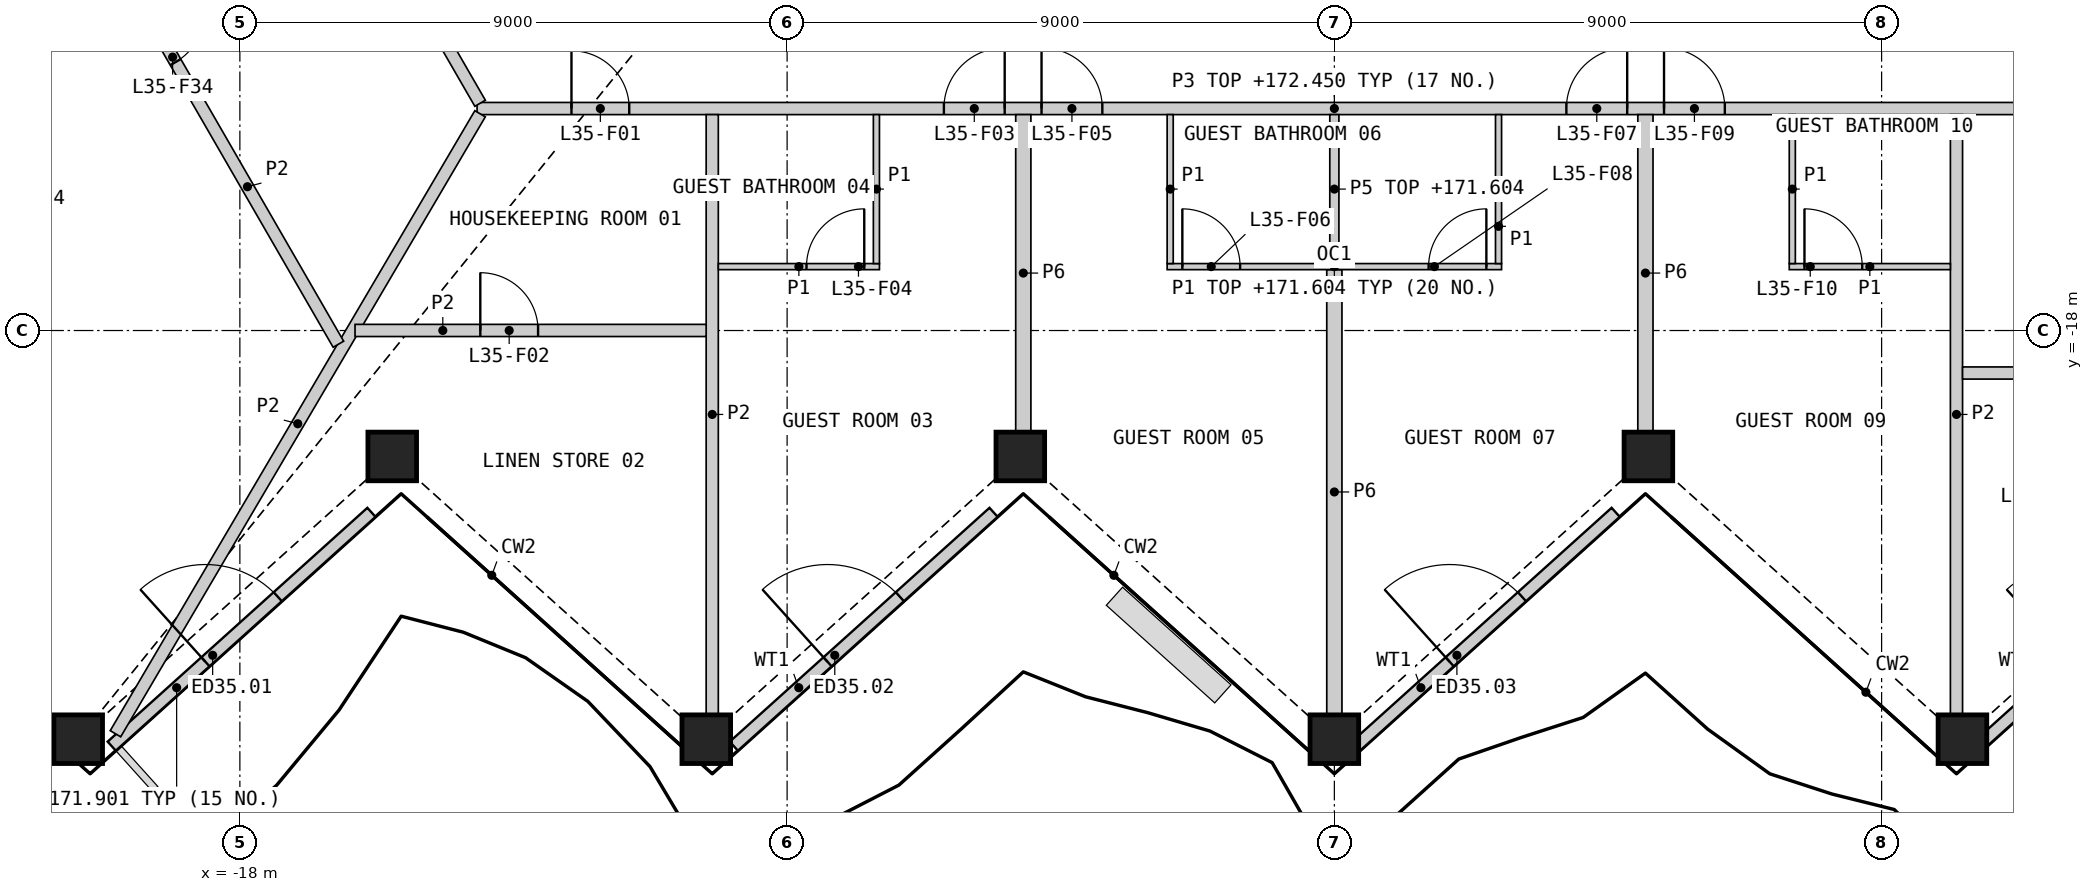
"""IFC4 building model, lengths in metres.
Left out: names, types, materials, properties, quantities, classifications, styles, units other than length and angle.
Written with IfcOpenShell. Run it as: python <this file> out.ifc"""

import sys

from ifc_helpers import new_model, si_unit, direction, frame, frame_2d, origin, origin_2d, place, context, subcontext, project, spatial, rectangle, hollow_rectangle, extrude, element, fill, save


model = new_model("IFC4")
c1 = context("Model", 3, precision=1e-05, world=origin(), true_north=direction((0.0, 1.0)))
c2 = subcontext(c1, "Body", "Model", "MODEL_VIEW")
j1 = project(units=[si_unit("LENGTHUNIT", "METRE"), si_unit("PLANEANGLEUNIT", "RADIAN")], contexts=[c1])
p1 = place(None, origin())
s1 = spatial("IfcSite", under=j1, at=p1, CompositionType="ELEMENT")
p2 = place(p1, origin())
s2 = spatial("IfcBuilding", under=s1, at=p2, CompositionType="ELEMENT")
p3 = place(p2, frame((0.0, 0.0, 169.2)))
s3 = spatial("IfcBuildingStorey", under=s2, at=p3, CompositionType="ELEMENT", Elevation=169.2)
for number, where, z_axis, x_axis in (
    (1, (-20.659, -24.722, 0.0), (0.0, 0.0, 1.0), (1.0, 0.0, 0.0)),
    (2, (-15.494, -20.071, 0.0), (0.0, 0.0, 1.0), (1.0, 0.0, 0.0)),
    (3, (-10.329, -24.722, 0.0), (0.0, 0.0, 1.0), (1.0, 0.0, 0.0)),
    (4, (-5.165, -20.071, 0.0), (0.0, 0.0, 1.0), (1.0, 0.0, 0.0)),
    (5, (0.0, -24.722, 0.0), (0.0, 0.0, 1.0), (1.0, 0.0, 0.0)),
    (6, (5.165, -20.071, 0.0), (0.0, 0.0, 1.0), (1.0, 0.0, 0.0)),
    (7, (10.329, -24.722, 0.0), (0.0, 0.0, 1.0), (1.0, 0.0, 0.0)),
):
    element("IfcColumn", number, at=place(p3, frame(where, z_axis=z_axis, x_axis=x_axis)), inside=s3, PredefinedType="COLUMN", context=c2, shape_type="SweptSolid", body=[
        extrude(hollow_rectangle(XDim=0.8, YDim=0.8, WallThickness=0.05, at=origin_2d()), origin(), (0.0, 0.0, 1.0), 3.6),
    ])
p4 = place(p3, frame((-20.108, -24.836, 0.0), z_axis=(0.0, 0.0, 1.0), x_axis=(0.74315473474, 0.669119600844, 0.0)))
e8 = element("IfcWall", 8, at=p4, inside=s3, PredefinedType="SOLIDWALL", context=c2, shape_type="SweptSolid", body=[
    extrude(rectangle(XDim=5.748, YDim=0.2, at=frame_2d((2.874, 0.0))), origin(), (0.0, 0.0, 1.0), 2.701),
])
p5 = place(p4, frame((2.074, 0.0, 0.0)))
e9 = element("IfcOpeningElement", 9, at=p5, cuts=e8, PredefinedType="OPENING", context=c2, shape_type="SweptSolid", body=[
    extrude(rectangle(XDim=1.6, YDim=2.4, at=frame_2d((0.8, 1.2))), frame((0.0, 0.11, 0.0), z_axis=(0.0, -1.0, 0.0), x_axis=(1.0, 0.0, 0.0)), (0.0, 0.0, 1.0), 0.22),
])
p6 = place(p3, frame((-9.876, -24.836, 0.0), z_axis=(0.0, 0.0, 1.0), x_axis=(0.74315473474, 0.669119600844, 0.0)))
e10 = element("IfcWall", 10, at=p6, inside=s3, PredefinedType="SOLIDWALL", context=c2, shape_type="SweptSolid", body=[
    extrude(rectangle(XDim=5.748, YDim=0.2, at=frame_2d((2.874, 0.0))), origin(), (0.0, 0.0, 1.0), 2.701),
])
p7 = place(p6, frame((2.074, 0.0, 0.0)))
e11 = element("IfcOpeningElement", 11, at=p7, cuts=e10, PredefinedType="OPENING", context=c2, shape_type="SweptSolid", body=[
    extrude(rectangle(XDim=1.6, YDim=2.4, at=frame_2d((0.8, 1.2))), frame((0.0, 0.11, 0.0), z_axis=(0.0, -1.0, 0.0), x_axis=(1.0, 0.0, 0.0)), (0.0, 0.0, 1.0), 0.22),
])
p8 = place(p3, frame((0.355, -24.836, 0.0), z_axis=(0.0, 0.0, 1.0), x_axis=(0.74315473474, 0.669119600844, 0.0)))
e12 = element("IfcWall", 12, at=p8, inside=s3, PredefinedType="SOLIDWALL", context=c2, shape_type="SweptSolid", body=[
    extrude(rectangle(XDim=5.748, YDim=0.2, at=frame_2d((2.874, 0.0))), origin(), (0.0, 0.0, 1.0), 2.701),
])
p9 = place(p8, frame((2.074, 0.0, 0.0)))
e13 = element("IfcOpeningElement", 13, at=p9, cuts=e12, PredefinedType="OPENING", context=c2, shape_type="SweptSolid", body=[
    extrude(rectangle(XDim=1.6, YDim=2.4, at=frame_2d((0.8, 1.2))), frame((0.0, 0.11, 0.0), z_axis=(0.0, -1.0, 0.0), x_axis=(1.0, 0.0, 0.0)), (0.0, 0.0, 1.0), 0.22),
])
p10 = place(p3, frame((10.587, -24.836, 0.0), z_axis=(0.0, 0.0, 1.0), x_axis=(0.74315473474, 0.669119600844, 0.0)))
e14 = element("IfcWall", 14, at=p10, inside=s3, PredefinedType="SOLIDWALL", context=c2, shape_type="SweptSolid", body=[
    extrude(rectangle(XDim=5.748, YDim=0.2, at=frame_2d((2.874, 0.0))), origin(), (0.0, 0.0, 1.0), 2.701),
])
p11 = place(p10, frame((2.074, 0.0, 0.0)))
e15 = element("IfcOpeningElement", 15, at=p11, cuts=e14, PredefinedType="OPENING", context=c2, shape_type="SweptSolid", body=[
    extrude(rectangle(XDim=1.6, YDim=2.4, at=frame_2d((0.8, 1.2))), frame((0.0, 0.11, 0.0), z_axis=(0.0, -1.0, 0.0), x_axis=(1.0, 0.0, 0.0)), (0.0, 0.0, 1.0), 0.22),
])
p12 = place(p3, frame((-14.099, -14.349, 0.0), z_axis=(0.0, 0.0, 1.0), x_axis=(1.0, 0.0, 0.0)))
e16 = element("IfcWall", 16, at=p12, inside=s3, PredefinedType="PARTITIONING", context=c2, shape_type="SweptSolid", body=[
    extrude(rectangle(XDim=28.198, YDim=0.2, at=frame_2d((14.099, 0.0))), origin(), (0.0, 0.0, 1.0), 3.25),
])
p13 = place(p12, frame((1.552, 0.0, 0.0)))
e17 = element("IfcOpeningElement", 17, at=p13, cuts=e16, PredefinedType="OPENING", context=c2, shape_type="SweptSolid", body=[
    extrude(rectangle(XDim=0.95, YDim=2.1, at=frame_2d((0.475, 1.05))), frame((0.0, 0.11, 0.0), z_axis=(0.0, -1.0, 0.0), x_axis=(1.0, 0.0, 0.0)), (0.0, 0.0, 1.0), 0.22),
])
p14 = place(p12, frame((7.677, 0.0, 0.0)))
e18 = element("IfcOpeningElement", 18, at=p14, cuts=e16, PredefinedType="OPENING", context=c2, shape_type="SweptSolid", body=[
    extrude(rectangle(XDim=1.0, YDim=2.1, at=frame_2d((0.5, 1.05))), frame((0.0, 0.11, 0.0), z_axis=(0.0, -1.0, 0.0), x_axis=(1.0, 0.0, 0.0)), (0.0, 0.0, 1.0), 0.22),
])
p15 = place(p12, frame((9.283, 0.0, 0.0)))
e19 = element("IfcOpeningElement", 19, at=p15, cuts=e16, PredefinedType="OPENING", context=c2, shape_type="SweptSolid", body=[
    extrude(rectangle(XDim=1.0, YDim=2.1, at=frame_2d((0.5, 1.05))), frame((0.0, 0.11, 0.0), z_axis=(0.0, -1.0, 0.0), x_axis=(1.0, 0.0, 0.0)), (0.0, 0.0, 1.0), 0.22),
])
p16 = place(p12, frame((17.915, 0.0, 0.0)))
e20 = element("IfcOpeningElement", 20, at=p16, cuts=e16, PredefinedType="OPENING", context=c2, shape_type="SweptSolid", body=[
    extrude(rectangle(XDim=1.0, YDim=2.1, at=frame_2d((0.5, 1.05))), frame((0.0, 0.11, 0.0), z_axis=(0.0, -1.0, 0.0), x_axis=(1.0, 0.0, 0.0)), (0.0, 0.0, 1.0), 0.22),
])
p17 = place(p12, frame((19.521, 0.0, 0.0)))
e21 = element("IfcOpeningElement", 21, at=p17, cuts=e16, PredefinedType="OPENING", context=c2, shape_type="SweptSolid", body=[
    extrude(rectangle(XDim=1.0, YDim=2.1, at=frame_2d((0.5, 1.05))), frame((0.0, 0.11, 0.0), z_axis=(0.0, -1.0, 0.0), x_axis=(1.0, 0.0, 0.0)), (0.0, 0.0, 1.0), 0.22),
])
p18 = place(p12, frame((25.696, 0.0, 0.0)))
e22 = element("IfcOpeningElement", 22, at=p18, cuts=e16, PredefinedType="OPENING", context=c2, shape_type="SweptSolid", body=[
    extrude(rectangle(XDim=0.95, YDim=2.1, at=frame_2d((0.475, 1.05))), frame((0.0, 0.11, 0.0), z_axis=(0.0, -1.0, 0.0), x_axis=(1.0, 0.0, 0.0)), (0.0, 0.0, 1.0), 0.22),
])
p19 = place(p3, frame((0.0, -24.312, 0.0), z_axis=(0.0, 0.0, 1.0), x_axis=(0.0, 1.0, 0.0)))
e23 = element("IfcWall", 23, at=p19, inside=s3, PredefinedType="PARTITIONING", context=c2, shape_type="SweptSolid", body=[
    extrude(rectangle(XDim=7.313, YDim=0.25, at=frame_2d((3.656, 0.0))), origin(), (0.0, 0.0, 1.0), 2.404),
])
for number, where, z_axis, x_axis in (
    (24, (-5.116, -19.661, 0.0), (0.0, 0.0, 1.0), (0.0, 1.0, 0.0)),
    (25, (5.116, -19.661, 0.0), (0.0, 0.0, 1.0), (0.0, 1.0, 0.0)),
):
    element("IfcWall", number, at=place(p3, frame(where, z_axis=z_axis, x_axis=x_axis)), inside=s3, PredefinedType="PARTITIONING", context=c2, shape_type="SweptSolid", body=[
        extrude(rectangle(XDim=5.212, YDim=0.25, at=frame_2d((2.606, 0.0))), origin(), (0.0, 0.0, 1.0), 2.404),
    ])
p20 = place(p3, frame((-15.55, -11.662, 0.0), z_axis=(0.0, 0.0, 1.0), x_axis=(0.500048608389, -0.865997337899, 0.0)))
e26 = element("IfcWall", 26, at=p20, inside=s3, PredefinedType="PARTITIONING", context=c2, shape_type="SweptSolid", body=[
    extrude(rectangle(XDim=3.002, YDim=0.2, at=frame_2d((1.501, 0.0))), origin(), (0.0, 0.0, 1.0), 3.25),
])
p21 = place(p3, frame((-20.046, -24.632, 0.0), z_axis=(0.0, 0.0, 1.0), x_axis=(0.50691549935, 0.86199575203, 0.0)))
e27 = element("IfcWall", 27, at=p21, inside=s3, PredefinedType="PARTITIONING", context=c2, shape_type="SweptSolid", body=[
    extrude(rectangle(XDim=11.83, YDim=0.2, at=frame_2d((5.915, 0.0))), origin(), (0.0, 0.0, 1.0), 2.404),
])
p22 = place(p3, frame((-22.363, -7.862, 0.0), z_axis=(0.0, 0.0, 1.0), x_axis=(0.500009728207, -0.866019787128, 0.0)))
e28 = element("IfcWall", 28, at=p22, inside=s3, PredefinedType="PARTITIONING", context=c2, shape_type="SweptSolid", body=[
    extrude(rectangle(XDim=11.967, YDim=0.2, at=frame_2d((5.983, 0.0))), origin(), (0.0, 0.0, 1.0), 2.404),
])
p23 = place(p22, frame((5.658, 0.0, 0.0)))
e29 = element("IfcOpeningElement", 29, at=p23, cuts=e28, PredefinedType="OPENING", context=c2, shape_type="SweptSolid", body=[
    extrude(rectangle(XDim=0.95, YDim=2.1, at=frame_2d((0.475, 1.05))), frame((0.0, 0.11, 0.0), z_axis=(0.0, -1.0, 0.0), x_axis=(1.0, 0.0, 0.0)), (0.0, 0.0, 1.0), 0.22),
])
for number, where, z_axis, x_axis in (
    (30, (-10.231, -24.312, 0.0), (0.0, 0.0, 1.0), (0.0, 1.0, 0.0)),
    (31, (10.231, -24.312, 0.0), (0.0, 0.0, 1.0), (0.0, 1.0, 0.0)),
):
    element("IfcWall", number, at=place(p3, frame(where, z_axis=z_axis, x_axis=x_axis)), inside=s3, PredefinedType="PARTITIONING", context=c2, shape_type="SweptSolid", body=[
        extrude(rectangle(XDim=9.863, YDim=0.2, at=frame_2d((4.931, 0.0))), origin(), (0.0, 0.0, 1.0), 2.404),
    ])
p24 = place(p3, frame((10.331, -18.699, 0.0), z_axis=(0.0, 0.0, 1.0), x_axis=(1.0, 0.0, 0.0)))
e32 = element("IfcWall", 32, at=p24, inside=s3, PredefinedType="PARTITIONING", context=c2, shape_type="SweptSolid", body=[
    extrude(rectangle(XDim=6.179, YDim=0.2, at=frame_2d((3.09, 0.0))), origin(), (0.0, 0.0, 1.0), 2.404),
])
p25 = place(p24, frame((2.866, 0.0, 0.0)))
e33 = element("IfcOpeningElement", 33, at=p25, cuts=e32, PredefinedType="OPENING", context=c2, shape_type="SweptSolid", body=[
    extrude(rectangle(XDim=0.95, YDim=2.1, at=frame_2d((0.475, 1.05))), frame((0.0, 0.11, 0.0), z_axis=(0.0, -1.0, 0.0), x_axis=(1.0, 0.0, 0.0)), (0.0, 0.0, 1.0), 0.22),
])
p26 = place(p3, frame((-16.106, -17.999, 0.0), z_axis=(0.0, 0.0, 1.0), x_axis=(1.0, 0.0, 0.0)))
e34 = element("IfcWall", 34, at=p26, inside=s3, PredefinedType="PARTITIONING", context=c2, shape_type="SweptSolid", body=[
    extrude(rectangle(XDim=5.775, YDim=0.2, at=frame_2d((2.887, 0.0))), origin(), (0.0, 0.0, 1.0), 2.404),
])
p27 = place(p26, frame((2.06, 0.0, 0.0)))
e35 = element("IfcOpeningElement", 35, at=p27, cuts=e34, PredefinedType="OPENING", context=c2, shape_type="SweptSolid", body=[
    extrude(rectangle(XDim=0.95, YDim=2.1, at=frame_2d((0.475, 1.05))), frame((0.0, 0.11, 0.0), z_axis=(0.0, -1.0, 0.0), x_axis=(1.0, 0.0, 0.0)), (0.0, 0.0, 1.0), 0.22),
])
p28 = place(p3, frame((0.0, -16.899, 0.0), z_axis=(0.0, 0.0, 1.0), x_axis=(0.0, 1.0, 0.0)))
e36 = element("IfcWall", 36, at=p28, inside=s3, PredefinedType="PLUMBINGWALL", context=c2, shape_type="SweptSolid", body=[
    extrude(rectangle(XDim=2.45, YDim=0.15, at=frame_2d((1.225, 0.0))), origin(), (0.0, 0.0, 1.0), 2.404),
])
p29 = place(p3, frame((-2.75, -16.949, 0.0), z_axis=(0.0, 0.0, 1.0), x_axis=(1.0, 0.0, 0.0)))
e37 = element("IfcWall", 37, at=p29, inside=s3, PredefinedType="PARTITIONING", context=c2, shape_type="SweptSolid", body=[
    extrude(rectangle(XDim=5.5, YDim=0.1, at=frame_2d((2.75, 0.0))), origin(), (0.0, 0.0, 1.0), 2.404),
])
p30 = place(p29, frame((0.25, 0.0, 0.0)))
e38 = element("IfcOpeningElement", 38, at=p30, cuts=e37, PredefinedType="OPENING", context=c2, shape_type="SweptSolid", body=[
    extrude(rectangle(XDim=0.95, YDim=2.1, at=frame_2d((0.475, 1.05))), frame((0.0, 0.06, 0.0), z_axis=(0.0, -1.0, 0.0), x_axis=(1.0, 0.0, 0.0)), (0.0, 0.0, 1.0), 0.12),
])
p31 = place(p29, frame((4.3, 0.0, 0.0)))
e39 = element("IfcOpeningElement", 39, at=p31, cuts=e37, PredefinedType="OPENING", context=c2, shape_type="SweptSolid", body=[
    extrude(rectangle(XDim=0.95, YDim=2.1, at=frame_2d((0.475, 1.05))), frame((0.0, 0.06, 0.0), z_axis=(0.0, -1.0, 0.0), x_axis=(1.0, 0.0, 0.0)), (0.0, 0.0, 1.0), 0.12),
])
p32 = place(p3, frame((-10.131, -16.949, 0.0), z_axis=(0.0, 0.0, 1.0), x_axis=(1.0, 0.0, 0.0)))
e40 = element("IfcWall", 40, at=p32, inside=s3, PredefinedType="PARTITIONING", context=c2, shape_type="SweptSolid", body=[
    extrude(rectangle(XDim=2.65, YDim=0.1, at=frame_2d((1.325, 0.0))), origin(), (0.0, 0.0, 1.0), 2.404),
])
p33 = place(p32, frame((1.45, 0.0, 0.0)))
e41 = element("IfcOpeningElement", 41, at=p33, cuts=e40, PredefinedType="OPENING", context=c2, shape_type="SweptSolid", body=[
    extrude(rectangle(XDim=0.95, YDim=2.1, at=frame_2d((0.475, 1.05))), frame((0.0, 0.06, 0.0), z_axis=(0.0, -1.0, 0.0), x_axis=(1.0, 0.0, 0.0)), (0.0, 0.0, 1.0), 0.12),
])
p34 = place(p3, frame((7.481, -16.949, 0.0), z_axis=(0.0, 0.0, 1.0), x_axis=(1.0, 0.0, 0.0)))
e42 = element("IfcWall", 42, at=p34, inside=s3, PredefinedType="PARTITIONING", context=c2, shape_type="SweptSolid", body=[
    extrude(rectangle(XDim=2.65, YDim=0.1, at=frame_2d((1.325, 0.0))), origin(), (0.0, 0.0, 1.0), 2.404),
])
p35 = place(p34, frame((0.25, 0.0, 0.0)))
e43 = element("IfcOpeningElement", 43, at=p35, cuts=e42, PredefinedType="OPENING", context=c2, shape_type="SweptSolid", body=[
    extrude(rectangle(XDim=0.95, YDim=2.1, at=frame_2d((0.475, 1.05))), frame((0.0, 0.06, 0.0), z_axis=(0.0, -1.0, 0.0), x_axis=(1.0, 0.0, 0.0)), (0.0, 0.0, 1.0), 0.12),
])
for number, where, z_axis, x_axis in (
    (44, (-7.531, -16.899, 0.0), (0.0, 0.0, 1.0), (0.0, 1.0, 0.0)),
    (45, (-2.7, -16.899, 0.0), (0.0, 0.0, 1.0), (0.0, 1.0, 0.0)),
    (46, (2.7, -16.899, 0.0), (0.0, 0.0, 1.0), (0.0, 1.0, 0.0)),
    (47, (7.531, -16.899, 0.0), (0.0, 0.0, 1.0), (0.0, 1.0, 0.0)),
):
    element("IfcWall", number, at=place(p3, frame(where, z_axis=z_axis, x_axis=x_axis)), inside=s3, PredefinedType="PARTITIONING", context=c2, shape_type="SweptSolid", body=[
        extrude(rectangle(XDim=2.45, YDim=0.1, at=frame_2d((1.225, 0.0))), origin(), (0.0, 0.0, 1.0), 2.404),
    ])
p36 = place(p5, origin())
e48 = element("IfcDoor", 48, at=p36, inside=s3, OperationType="DOUBLE_DOOR_SINGLE_SWING", PredefinedType="DOOR", context=c2, shape_type="SweptSolid", body=[
    extrude(rectangle(XDim=1.6, YDim=2.4, at=frame_2d((0.8, 1.2))), frame((0.0, 0.025, 0.0), z_axis=(0.0, -1.0, 0.0), x_axis=(1.0, 0.0, 0.0)), (0.0, 0.0, 1.0), 0.05),
])
fill(e9, e48)
p37 = place(p7, origin())
e49 = element("IfcDoor", 49, at=p37, inside=s3, OperationType="DOUBLE_DOOR_SINGLE_SWING", PredefinedType="DOOR", context=c2, shape_type="SweptSolid", body=[
    extrude(rectangle(XDim=1.6, YDim=2.4, at=frame_2d((0.8, 1.2))), frame((0.0, 0.025, 0.0), z_axis=(0.0, -1.0, 0.0), x_axis=(1.0, 0.0, 0.0)), (0.0, 0.0, 1.0), 0.05),
])
fill(e11, e49)
p38 = place(p9, origin())
e50 = element("IfcDoor", 50, at=p38, inside=s3, OperationType="DOUBLE_DOOR_SINGLE_SWING", PredefinedType="DOOR", context=c2, shape_type="SweptSolid", body=[
    extrude(rectangle(XDim=1.6, YDim=2.4, at=frame_2d((0.8, 1.2))), frame((0.0, 0.025, 0.0), z_axis=(0.0, -1.0, 0.0), x_axis=(1.0, 0.0, 0.0)), (0.0, 0.0, 1.0), 0.05),
])
fill(e13, e50)
p39 = place(p13, origin())
e51 = element("IfcDoor", 51, at=p39, inside=s3, OperationType="SINGLE_SWING_LEFT", PredefinedType="DOOR", context=c2, shape_type="SweptSolid", body=[
    extrude(rectangle(XDim=0.95, YDim=2.1, at=frame_2d((0.475, 1.05))), frame((0.0, 0.025, 0.0), z_axis=(0.0, -1.0, 0.0), x_axis=(1.0, 0.0, 0.0)), (0.0, 0.0, 1.0), 0.05),
])
fill(e17, e51)
p40 = place(p27, origin())
e52 = element("IfcDoor", 52, at=p40, inside=s3, OperationType="SINGLE_SWING_LEFT", PredefinedType="DOOR", context=c2, shape_type="SweptSolid", body=[
    extrude(rectangle(XDim=0.95, YDim=2.1, at=frame_2d((0.475, 1.05))), frame((0.0, 0.025, 0.0), z_axis=(0.0, -1.0, 0.0), x_axis=(1.0, 0.0, 0.0)), (0.0, 0.0, 1.0), 0.05),
])
fill(e35, e52)
p41 = place(p14, origin())
e53 = element("IfcDoor", 53, at=p41, inside=s3, OperationType="SINGLE_SWING_RIGHT", PredefinedType="DOOR", context=c2, shape_type="SweptSolid", body=[
    extrude(rectangle(XDim=1.0, YDim=2.1, at=frame_2d((0.5, 1.05))), frame((0.0, 0.025, 0.0), z_axis=(0.0, -1.0, 0.0), x_axis=(1.0, 0.0, 0.0)), (0.0, 0.0, 1.0), 0.05),
])
fill(e18, e53)
p42 = place(p33, origin())
e54 = element("IfcDoor", 54, at=p42, inside=s3, OperationType="SINGLE_SWING_RIGHT", PredefinedType="DOOR", context=c2, shape_type="SweptSolid", body=[
    extrude(rectangle(XDim=0.95, YDim=2.1, at=frame_2d((0.475, 1.05))), frame((0.0, 0.025, 0.0), z_axis=(0.0, -1.0, 0.0), x_axis=(1.0, 0.0, 0.0)), (0.0, 0.0, 1.0), 0.05),
])
fill(e41, e54)
p43 = place(p15, origin())
e55 = element("IfcDoor", 55, at=p43, inside=s3, OperationType="SINGLE_SWING_LEFT", PredefinedType="DOOR", context=c2, shape_type="SweptSolid", body=[
    extrude(rectangle(XDim=1.0, YDim=2.1, at=frame_2d((0.5, 1.05))), frame((0.0, 0.025, 0.0), z_axis=(0.0, -1.0, 0.0), x_axis=(1.0, 0.0, 0.0)), (0.0, 0.0, 1.0), 0.05),
])
fill(e19, e55)
p44 = place(p30, origin())
e56 = element("IfcDoor", 56, at=p44, inside=s3, OperationType="SINGLE_SWING_LEFT", PredefinedType="DOOR", context=c2, shape_type="SweptSolid", body=[
    extrude(rectangle(XDim=0.95, YDim=2.1, at=frame_2d((0.475, 1.05))), frame((0.0, 0.025, 0.0), z_axis=(0.0, -1.0, 0.0), x_axis=(1.0, 0.0, 0.0)), (0.0, 0.0, 1.0), 0.05),
])
fill(e38, e56)
p45 = place(p16, origin())
e57 = element("IfcDoor", 57, at=p45, inside=s3, OperationType="SINGLE_SWING_RIGHT", PredefinedType="DOOR", context=c2, shape_type="SweptSolid", body=[
    extrude(rectangle(XDim=1.0, YDim=2.1, at=frame_2d((0.5, 1.05))), frame((0.0, 0.025, 0.0), z_axis=(0.0, -1.0, 0.0), x_axis=(1.0, 0.0, 0.0)), (0.0, 0.0, 1.0), 0.05),
])
fill(e20, e57)
p46 = place(p31, origin())
e58 = element("IfcDoor", 58, at=p46, inside=s3, OperationType="SINGLE_SWING_RIGHT", PredefinedType="DOOR", context=c2, shape_type="SweptSolid", body=[
    extrude(rectangle(XDim=0.95, YDim=2.1, at=frame_2d((0.475, 1.05))), frame((0.0, 0.025, 0.0), z_axis=(0.0, -1.0, 0.0), x_axis=(1.0, 0.0, 0.0)), (0.0, 0.0, 1.0), 0.05),
])
fill(e39, e58)
p47 = place(p17, origin())
e59 = element("IfcDoor", 59, at=p47, inside=s3, OperationType="SINGLE_SWING_LEFT", PredefinedType="DOOR", context=c2, shape_type="SweptSolid", body=[
    extrude(rectangle(XDim=1.0, YDim=2.1, at=frame_2d((0.5, 1.05))), frame((0.0, 0.025, 0.0), z_axis=(0.0, -1.0, 0.0), x_axis=(1.0, 0.0, 0.0)), (0.0, 0.0, 1.0), 0.05),
])
fill(e21, e59)
p48 = place(p35, origin())
e60 = element("IfcDoor", 60, at=p48, inside=s3, OperationType="SINGLE_SWING_LEFT", PredefinedType="DOOR", context=c2, shape_type="SweptSolid", body=[
    extrude(rectangle(XDim=0.95, YDim=2.1, at=frame_2d((0.475, 1.05))), frame((0.0, 0.025, 0.0), z_axis=(0.0, -1.0, 0.0), x_axis=(1.0, 0.0, 0.0)), (0.0, 0.0, 1.0), 0.05),
])
fill(e43, e60)
p49 = place(p23, origin())
e61 = element("IfcDoor", 61, at=p49, inside=s3, OperationType="SINGLE_SWING_LEFT", PredefinedType="DOOR", context=c2, shape_type="SweptSolid", body=[
    extrude(rectangle(XDim=0.95, YDim=2.1, at=frame_2d((0.475, 1.05))), frame((0.0, 0.025, 0.0), z_axis=(0.0, -1.0, 0.0), x_axis=(1.0, 0.0, 0.0)), (0.0, 0.0, 1.0), 0.05),
])
fill(e29, e61)
save(model, sys.argv[1])
